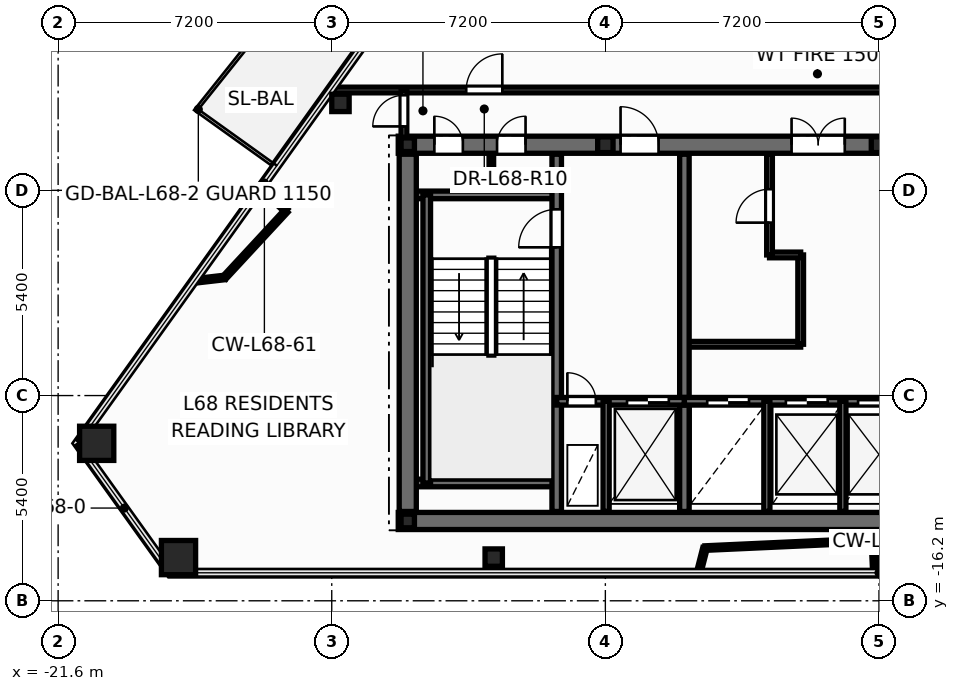
"""IFC4 building model, lengths in metres.
Left out: names, types, materials, properties, quantities, classifications, styles, units other than length and angle.
Written with IfcOpenShell. Run it as: python <this file> out.ifc"""

import sys

from ifc_helpers import new_model, si_unit, direction, frame, frame_2d, origin, origin_2d, place, context, subcontext, project, spatial, rectangle, hollow_rectangle, hollow_circle, i_section, extrude, element, fill, save


model = new_model("IFC4")
c1 = context("Model", 3, precision=1e-05, world=origin(), true_north=direction((0.0, 1.0)))
c2 = subcontext(c1, "Body", "Model", "MODEL_VIEW")
j1 = project(units=[si_unit("LENGTHUNIT", "METRE"), si_unit("PLANEANGLEUNIT", "RADIAN")], contexts=[c1])
p1 = place(None, origin())
s1 = spatial("IfcSite", under=j1, at=p1, CompositionType="ELEMENT")
p2 = place(p1, origin())
s2 = spatial("IfcBuilding", under=s1, at=p2, CompositionType="ELEMENT")
p3 = place(p2, frame((0.0, 0.0, 259.8)))
s3 = spatial("IfcBuildingStorey", under=s2, at=p3, CompositionType="ELEMENT", Elevation=259.8)
for number, where, z_axis, x_axis in (
    (1, (-20.585, -12.057, 0.0), (0.0, 0.0, 1.0), (1.0, 0.0, 0.0)),
    (2, (-18.432, -15.063, 0.0), (0.0, 0.0, 1.0), (1.0, 0.0, 0.0)),
):
    element("IfcColumn", number, at=place(p3, frame(where, z_axis=z_axis, x_axis=x_axis)), inside=s3, PredefinedType="COLUMN", context=c2, shape_type="SweptSolid", body=[
        extrude(hollow_rectangle(XDim=0.9, YDim=0.9, WallThickness=0.04, at=origin_2d()), origin(), (0.0, 0.0, 1.0), 3.6),
    ])
for number, where, z_axis, x_axis in (
    (3, (-10.138, -15.063, 0.0), (0.0, 0.0, 1.0), (1.0, 0.0, 0.0)),
    (4, (-14.171, -3.099, 0.0), (0.0, 0.0, 1.0), (1.0, 0.0, 0.0)),
):
    element("IfcColumn", number, at=place(p3, frame(where, z_axis=z_axis, x_axis=x_axis)), inside=s3, PredefinedType="COLUMN", context=c2, shape_type="SweptSolid", body=[
        extrude(hollow_circle(Radius=0.229, WallThickness=0.016, at=origin_2d()), origin(), (0.0, 0.0, 1.0), 3.6),
    ])
for number, where, z_axis, x_axis in (
    (5, (-12.4, -14.1, 0.0), (0.0, 0.0, 1.0), (1.0, 0.0, 0.0)),
    (6, (-12.4, -4.2, 0.0), (0.0, 0.0, 1.0), (1.0, 0.0, 0.0)),
):
    element("IfcColumn", number, at=place(p3, frame(where, z_axis=z_axis, x_axis=x_axis)), inside=s3, PredefinedType="COLUMN", context=c2, shape_type="SweptSolid", body=[
        extrude(i_section(OverallWidth=0.352, OverallDepth=0.359, WebThickness=0.018, FlangeThickness=0.026, at=origin_2d()), origin(), (0.0, 0.0, 1.0), 3.6),
    ])
for number, where, z_axis, x_axis in (
    (7, (-7.2, -4.2, 0.0), (0.0, 0.0, 1.0), (1.0, 0.0, 0.0)),
    (8, (0.0, -4.2, 0.0), (0.0, 0.0, 1.0), (1.0, 0.0, 0.0)),
):
    element("IfcColumn", number, at=place(p3, frame(where, z_axis=z_axis, x_axis=x_axis)), inside=s3, PredefinedType="PILASTER", context=c2, shape_type="SweptSolid", body=[
        extrude(i_section(OverallWidth=0.405, OverallDepth=0.414, WebThickness=0.022, FlangeThickness=0.032, at=origin_2d()), origin(), (0.0, 0.0, 1.0), 3.6),
    ])
p4 = place(p3, frame((-5.12, -9.45, 0.0), z_axis=(0.0, 0.0, 1.0), x_axis=(1.0, 0.0, 0.0)))
e9 = element("IfcWall", 9, at=p4, inside=s3, PredefinedType="PARTITIONING", context=c2, shape_type="SweptSolid", body=[
    extrude(rectangle(XDim=3.06, YDim=0.15, at=frame_2d((1.53, 0.0))), origin(), (0.0, 0.0, 1.0), 3.345),
])
p5 = place(p3, frame((-2.06, -9.45, 0.0), z_axis=(0.0, 0.0, 1.0), x_axis=(0.0, 1.0, 0.0)))
e10 = element("IfcWall", 10, at=p5, inside=s3, PredefinedType="PARTITIONING", context=c2, shape_type="SweptSolid", body=[
    extrude(rectangle(XDim=2.35, YDim=0.15, at=frame_2d((1.175, 0.0))), origin(), (0.0, 0.0, 1.0), 3.345),
])
p6 = place(p3, frame((-2.88, -7.1, 0.0), z_axis=(0.0, 0.0, 1.0), x_axis=(1.0, 0.0, 0.0)))
e11 = element("IfcWall", 11, at=p6, inside=s3, PredefinedType="PARTITIONING", context=c2, shape_type="SweptSolid", body=[
    extrude(rectangle(XDim=0.82, YDim=0.15, at=frame_2d((0.41, 0.0))), origin(), (0.0, 0.0, 1.0), 3.345),
])
p7 = place(p3, frame((-2.88, -7.1, 0.0), z_axis=(0.0, 0.0, 1.0), x_axis=(0.0, 1.0, 0.0)))
e12 = element("IfcWall", 12, at=p7, inside=s3, PredefinedType="PARTITIONING", context=c2, shape_type="SweptSolid", body=[
    extrude(rectangle(XDim=2.65, YDim=0.15, at=frame_2d((1.325, 0.0))), origin(), (0.0, 0.0, 1.0), 3.345),
])
p8 = place(p7, frame((0.85, 0.0, 0.0)))
e13 = element("IfcOpeningElement", 13, at=p8, cuts=e12, PredefinedType="OPENING", context=c2, shape_type="SweptSolid", body=[
    extrude(rectangle(XDim=0.886, YDim=2.104, at=frame_2d((0.44, 1.052))), frame((0.0, 0.085, 0.0), z_axis=(0.0, -1.0, 0.0), x_axis=(1.0, 0.0, 0.0)), (0.0, 0.0, 1.0), 0.17),
])
p9 = place(p3, frame((-10.2, -5.52, 0.0), z_axis=(0.0, 0.0, 1.0), x_axis=(0.0, 1.0, 0.0)))
e14 = element("IfcWall", 14, at=p9, inside=s3, PredefinedType="PARTITIONING", context=c2, shape_type="SweptSolid", body=[
    extrude(rectangle(XDim=1.12, YDim=0.12, at=frame_2d((0.56, 0.0))), origin(), (0.0, 0.0, 1.0), 3.345),
])
p10 = place(p3, frame((-12.65, -14.1, 0.0), z_axis=(0.0, 0.0, 1.0), x_axis=(1.0, 0.0, 0.0)))
e15 = element("IfcWall", 15, at=p10, inside=s3, PredefinedType="SHEAR", context=c2, shape_type="SweptSolid", body=[
    extrude(rectangle(XDim=25.3, YDim=0.45, at=frame_2d((12.65, 0.0))), origin(), (0.0, 0.0, 1.0), 3.6),
])
p11 = place(p3, frame((-12.65, -4.2, 0.0), z_axis=(0.0, 0.0, 1.0), x_axis=(1.0, 0.0, 0.0)))
e16 = element("IfcWall", 16, at=p11, inside=s3, PredefinedType="SHEAR", context=c2, shape_type="SweptSolid", body=[
    extrude(rectangle(XDim=25.3, YDim=0.45, at=frame_2d((12.65, 0.0))), origin(), (0.0, 0.0, 1.0), 3.6),
])
p12 = place(p11, frame((0.95, 0.0, 0.0)))
e17 = element("IfcOpeningElement", 17, at=p12, cuts=e16, PredefinedType="OPENING", context=c2, shape_type="SweptSolid", body=[
    extrude(rectangle(XDim=0.756, YDim=2.054, at=frame_2d((0.375, 1.027))), frame((0.0, 0.235, 0.0), z_axis=(0.0, -1.0, 0.0), x_axis=(1.0, 0.0, 0.0)), (0.0, 0.0, 1.0), 0.47),
])
p13 = place(p11, frame((2.6, 0.0, 0.0)))
e18 = element("IfcOpeningElement", 18, at=p13, cuts=e16, PredefinedType="OPENING", context=c2, shape_type="SweptSolid", body=[
    extrude(rectangle(XDim=0.756, YDim=2.054, at=frame_2d((0.375, 1.027))), frame((0.0, 0.235, 0.0), z_axis=(0.0, -1.0, 0.0), x_axis=(1.0, 0.0, 0.0)), (0.0, 0.0, 1.0), 0.47),
])
p14 = place(p11, frame((21.85, 0.0, 0.0)))
e19 = element("IfcOpeningElement", 19, at=p14, cuts=e16, PredefinedType="OPENING", context=c2, shape_type="SweptSolid", body=[
    extrude(rectangle(XDim=0.756, YDim=2.054, at=frame_2d((0.375, 1.027))), frame((0.0, 0.235, 0.0), z_axis=(0.0, -1.0, 0.0), x_axis=(1.0, 0.0, 0.0)), (0.0, 0.0, 1.0), 0.47),
])
p15 = place(p11, frame((23.5, 0.0, 0.0)))
e20 = element("IfcOpeningElement", 20, at=p15, cuts=e16, PredefinedType="OPENING", context=c2, shape_type="SweptSolid", body=[
    extrude(rectangle(XDim=0.756, YDim=2.054, at=frame_2d((0.375, 1.027))), frame((0.0, 0.235, 0.0), z_axis=(0.0, -1.0, 0.0), x_axis=(1.0, 0.0, 0.0)), (0.0, 0.0, 1.0), 0.47),
])
p16 = place(p11, frame((5.85, 0.0, 0.0)))
e21 = element("IfcOpeningElement", 21, at=p16, cuts=e16, PredefinedType="OPENING", context=c2, shape_type="SweptSolid", body=[
    extrude(rectangle(XDim=1.006, YDim=2.104, at=frame_2d((0.5, 1.052))), frame((0.0, 0.235, 0.0), z_axis=(0.0, -1.0, 0.0), x_axis=(1.0, 0.0, 0.0)), (0.0, 0.0, 1.0), 0.47),
])
p17 = place(p11, frame((10.35, 0.0, 0.0)))
e22 = element("IfcOpeningElement", 22, at=p17, cuts=e16, PredefinedType="OPENING", context=c2, shape_type="SweptSolid", body=[
    extrude(rectangle(XDim=1.406, YDim=2.154, at=frame_2d((0.7, 1.077))), frame((0.0, 0.235, 0.0), z_axis=(0.0, -1.0, 0.0), x_axis=(1.0, 0.0, 0.0)), (0.0, 0.0, 1.0), 0.47),
])
p18 = place(p11, frame((18.45, 0.0, 0.0)))
e23 = element("IfcOpeningElement", 23, at=p18, cuts=e16, PredefinedType="OPENING", context=c2, shape_type="SweptSolid", body=[
    extrude(rectangle(XDim=1.006, YDim=2.104, at=frame_2d((0.5, 1.052))), frame((0.0, 0.235, 0.0), z_axis=(0.0, -1.0, 0.0), x_axis=(1.0, 0.0, 0.0)), (0.0, 0.0, 1.0), 0.47),
])
for number, where, z_axis, x_axis in (
    (24, (-12.35, -5.52, 0.0), (0.0, 0.0, 1.0), (1.0, 0.0, 0.0)),
    (25, (-12.35, -13.1, 0.0), (0.0, 0.0, 1.0), (1.0, 0.0, 0.0)),
):
    element("IfcWall", number, at=place(p3, frame(where, z_axis=z_axis, x_axis=x_axis)), inside=s3, PredefinedType="SOLIDWALL", context=c2, shape_type="SweptSolid", body=[
        extrude(rectangle(XDim=3.87, YDim=0.2, at=frame_2d((1.935, 0.0))), origin(), (0.0, 0.0, 1.0), 3.6),
    ])
p19 = place(p3, frame((-11.9, -13.1, 0.0), z_axis=(0.0, 0.0, 1.0), x_axis=(0.0, 1.0, 0.0)))
e26 = element("IfcWall", 26, at=p19, inside=s3, PredefinedType="SOLIDWALL", context=c2, shape_type="SweptSolid", body=[
    extrude(rectangle(XDim=7.58, YDim=0.2, at=frame_2d((3.79, 0.0))), origin(), (0.0, 0.0, 1.0), 3.6),
])
p20 = place(p3, frame((-8.48, -13.85, 0.0), z_axis=(0.0, 0.0, 1.0), x_axis=(0.0, 1.0, 0.0)))
e27 = element("IfcWall", 27, at=p20, inside=s3, PredefinedType="SHEAR", context=c2, shape_type="SweptSolid", body=[
    extrude(rectangle(XDim=9.4, YDim=0.25, at=frame_2d((4.7, 0.0))), origin(), (0.0, 0.0, 1.0), 3.6),
])
p21 = place(p20, frame((6.95, 0.0, 0.0)))
e28 = element("IfcOpeningElement", 28, at=p21, cuts=e27, PredefinedType="OPENING", context=c2, shape_type="SweptSolid", body=[
    extrude(rectangle(XDim=1.006, YDim=2.104, at=frame_2d((0.5, 1.052))), frame((0.0, 0.135, 0.0), z_axis=(0.0, -1.0, 0.0), x_axis=(1.0, 0.0, 0.0)), (0.0, 0.0, 1.0), 0.27),
])
p22 = place(p3, frame((-5.12, -13.85, 0.0), z_axis=(0.0, 0.0, 1.0), x_axis=(0.0, 1.0, 0.0)))
e29 = element("IfcWall", 29, at=p22, inside=s3, PredefinedType="SHEAR", context=c2, shape_type="SweptSolid", body=[
    extrude(rectangle(XDim=9.4, YDim=0.25, at=frame_2d((4.7, 0.0))), origin(), (0.0, 0.0, 1.0), 3.6),
])
p23 = place(p3, frame((-8.48, -10.95, 0.0), z_axis=(0.0, 0.0, 1.0), x_axis=(1.0, 0.0, 0.0)))
e30 = element("IfcWall", 30, at=p23, inside=s3, PredefinedType="SOLIDWALL", context=c2, shape_type="SweptSolid", body=[
    extrude(rectangle(XDim=3.36, YDim=0.2, at=frame_2d((1.68, 0.0))), origin(), (0.0, 0.0, 1.0), 3.6),
])
p24 = place(p23, frame((0.28, 0.0, 0.0)))
e31 = element("IfcOpeningElement", 31, at=p24, cuts=e30, PredefinedType="OPENING", context=c2, shape_type="SweptSolid", body=[
    extrude(rectangle(XDim=0.756, YDim=2.054, at=frame_2d((0.375, 1.027))), frame((0.0, 0.11, 0.0), z_axis=(0.0, -1.0, 0.0), x_axis=(1.0, 0.0, 0.0)), (0.0, 0.0, 1.0), 0.22),
])
p25 = place(p23, frame((1.85, 0.0, 0.0)))
e32 = element("IfcOpeningElement", 32, at=p25, cuts=e30, PredefinedType="OPENING", context=c2, shape_type="SweptSolid", body=[
    extrude(rectangle(XDim=1.106, YDim=2.104, at=frame_2d((0.55, 1.052))), frame((0.0, 0.11, 0.0), z_axis=(0.0, -1.0, 0.0), x_axis=(1.0, 0.0, 0.0)), (0.0, 0.0, 1.0), 0.22),
])
p26 = place(p3, frame((-5.12, -10.95, 0.0), z_axis=(0.0, 0.0, 1.0), x_axis=(1.0, 0.0, 0.0)))
e33 = element("IfcWall", 33, at=p26, inside=s3, PredefinedType="SOLIDWALL", context=c2, shape_type="SweptSolid", body=[
    extrude(rectangle(XDim=10.24, YDim=0.2, at=frame_2d((5.12, 0.0))), origin(), (0.0, 0.0, 1.0), 3.6),
])
p27 = place(p26, frame((0.6, 0.0, 0.0)))
e34 = element("IfcOpeningElement", 34, at=p27, cuts=e33, PredefinedType="OPENING", context=c2, shape_type="SweptSolid", body=[
    extrude(rectangle(XDim=1.106, YDim=2.104, at=frame_2d((0.55, 1.052))), frame((0.0, 0.11, 0.0), z_axis=(0.0, -1.0, 0.0), x_axis=(1.0, 0.0, 0.0)), (0.0, 0.0, 1.0), 0.22),
])
p28 = place(p26, frame((2.67, 0.0, 0.0)))
e35 = element("IfcOpeningElement", 35, at=p28, cuts=e33, PredefinedType="OPENING", context=c2, shape_type="SweptSolid", body=[
    extrude(rectangle(XDim=1.106, YDim=2.104, at=frame_2d((0.55, 1.052))), frame((0.0, 0.11, 0.0), z_axis=(0.0, -1.0, 0.0), x_axis=(1.0, 0.0, 0.0)), (0.0, 0.0, 1.0), 0.22),
])
p29 = place(p26, frame((4.57, 0.0, 0.0)))
e36 = element("IfcOpeningElement", 36, at=p29, cuts=e33, PredefinedType="OPENING", context=c2, shape_type="SweptSolid", body=[
    extrude(rectangle(XDim=1.106, YDim=2.104, at=frame_2d((0.55, 1.052))), frame((0.0, 0.11, 0.0), z_axis=(0.0, -1.0, 0.0), x_axis=(1.0, 0.0, 0.0)), (0.0, 0.0, 1.0), 0.22),
])
p30 = place(p26, frame((6.47, 0.0, 0.0)))
e37 = element("IfcOpeningElement", 37, at=p30, cuts=e33, PredefinedType="OPENING", context=c2, shape_type="SweptSolid", body=[
    extrude(rectangle(XDim=1.106, YDim=2.104, at=frame_2d((0.55, 1.052))), frame((0.0, 0.11, 0.0), z_axis=(0.0, -1.0, 0.0), x_axis=(1.0, 0.0, 0.0)), (0.0, 0.0, 1.0), 0.22),
])
p31 = place(p26, frame((8.54, 0.0, 0.0)))
e38 = element("IfcOpeningElement", 38, at=p31, cuts=e33, PredefinedType="OPENING", context=c2, shape_type="SweptSolid", body=[
    extrude(rectangle(XDim=1.106, YDim=2.104, at=frame_2d((0.55, 1.052))), frame((0.0, 0.11, 0.0), z_axis=(0.0, -1.0, 0.0), x_axis=(1.0, 0.0, 0.0)), (0.0, 0.0, 1.0), 0.22),
])
for number, where, z_axis, x_axis in (
    (39, (-7.18, -13.85, 0.0), (0.0, 0.0, 1.0), (0.0, 1.0, 0.0)),
    (40, (-2.95, -13.85, 0.0), (0.0, 0.0, 1.0), (0.0, 1.0, 0.0)),
):
    element("IfcWall", number, at=place(p3, frame(where, z_axis=z_axis, x_axis=x_axis)), inside=s3, PredefinedType="PARTITIONING", context=c2, shape_type="SweptSolid", body=[
        extrude(rectangle(XDim=2.9, YDim=0.16, at=frame_2d((1.45, 0.0))), origin(), (0.0, 0.0, 1.0), 2.57),
    ])
p32 = place(p3, frame((-12.4, -13.85, 0.0), z_axis=(0.0, 0.0, 1.0), x_axis=(0.0, 1.0, 0.0)))
e41 = element("IfcWall", 41, at=p32, inside=s3, PredefinedType="SHEAR", context=c2, shape_type="SweptSolid", body=[
    extrude(rectangle(XDim=9.4, YDim=0.45, at=frame_2d((4.7, 0.0))), origin(), (0.0, 0.0, 1.0), 3.6),
])
p33 = place(p3, frame((-0.95, -13.85, 0.0), z_axis=(0.0, 0.0, 1.0), x_axis=(0.0, 1.0, 0.0)))
e42 = element("IfcWall", 42, at=p33, inside=s3, PredefinedType="PARTITIONING", context=c2, shape_type="SweptSolid", body=[
    extrude(rectangle(XDim=2.9, YDim=0.16, at=frame_2d((1.45, 0.0))), origin(), (0.0, 0.0, 1.0), 2.57),
])
p34 = place(p3, frame((-14.42, -2.76, 0.0), z_axis=(0.0, 0.0, 1.0), x_axis=(1.0, 0.0, 0.0)))
e43 = element("IfcWall", 43, at=p34, inside=s3, PredefinedType="PARTITIONING", context=c2, shape_type="SweptSolid", body=[
    extrude(rectangle(XDim=15.06, YDim=0.15, at=frame_2d((7.53, 0.0))), origin(), (0.0, 0.0, 1.0), 2.32),
])
p35 = place(p34, frame((3.559, 0.0, 0.0)))
e44 = element("IfcOpeningElement", 44, at=p35, cuts=e43, PredefinedType="OPENING", context=c2, shape_type="SweptSolid", body=[
    extrude(rectangle(XDim=0.956, YDim=2.104, at=frame_2d((0.475, 1.052))), frame((0.0, 0.085, 0.0), z_axis=(0.0, -1.0, 0.0), x_axis=(1.0, 0.0, 0.0)), (0.0, 0.0, 1.0), 0.17),
])
p36 = place(p3, frame((-4.578, -14.813, 0.0), z_axis=(0.0, 0.0, 1.0), x_axis=(0.998953966619, 0.045727153589, 0.0)))
e45 = element("IfcWall", 45, at=p36, inside=s3, PredefinedType="PARTITIONING", context=c2, shape_type="SweptSolid", body=[
    extrude(rectangle(XDim=4.437, YDim=0.12, at=frame_2d((2.218, 0.0))), origin(), (0.0, 0.0, 1.0), 3.345),
])
p37 = place(p3, frame((-15.595, -5.938, 0.0), z_axis=(0.0, 0.0, 1.0), x_axis=(-0.679546396481, -0.733632534059, 0.0)))
e46 = element("IfcWall", 46, at=p37, inside=s3, PredefinedType="PARTITIONING", context=c2, shape_type="SweptSolid", body=[
    extrude(rectangle(XDim=2.392, YDim=0.12, at=frame_2d((1.196, 0.0))), origin(), (0.0, 0.0, 1.0), 3.345),
])
p38 = place(p3, frame((-12.5, -4.24, 0.0), z_axis=(0.0, 0.0, 1.0), x_axis=(0.0, 1.0, 0.0)))
e47 = element("IfcWall", 47, at=p38, inside=s3, PredefinedType="PARTITIONING", context=c2, shape_type="SweptSolid", body=[
    extrude(rectangle(XDim=1.48, YDim=0.15, at=frame_2d((0.74, 0.0))), origin(), (0.0, 0.0, 1.0), 2.32),
])
p39 = place(p38, frame((0.522, 0.0, 0.0)))
e48 = element("IfcOpeningElement", 48, at=p39, cuts=e47, PredefinedType="OPENING", context=c2, shape_type="SweptSolid", body=[
    extrude(rectangle(XDim=0.826, YDim=2.104, at=frame_2d((0.41, 1.052))), frame((0.0, 0.085, 0.0), z_axis=(0.0, -1.0, 0.0), x_axis=(1.0, 0.0, 0.0)), (0.0, 0.0, 1.0), 0.17),
])
p40 = place(p3, frame((-16.249, -5.332, 0.0), z_axis=(0.0, 0.0, 1.0), x_axis=(0.733563468534, -0.679620951437, 0.0)))
e49 = element("IfcWall", 49, at=p40, inside=s3, PredefinedType="PARTITIONING", context=c2, shape_type="SweptSolid", body=[
    extrude(rectangle(XDim=0.892, YDim=0.12, at=frame_2d((0.446, 0.0))), origin(), (0.0, 0.0, 1.0), 2.863),
])
p41 = place(p3, frame((-0.146, -14.61, 0.0), z_axis=(0.0, 0.0, 1.0), x_axis=(0.045709485804, -0.998954775206, 0.0)))
e50 = element("IfcWall", 50, at=p41, inside=s3, PredefinedType="PARTITIONING", context=c2, shape_type="SweptSolid", body=[
    extrude(rectangle(XDim=0.844, YDim=0.12, at=frame_2d((0.422, 0.0))), origin(), (0.0, 0.0, 1.0), 2.863),
])
p42 = place(p3, frame((-17.221, -7.693, 0.0), z_axis=(0.0, 0.0, 1.0), x_axis=(-0.993422482681, -0.114506641306, 0.0)))
e51 = element("IfcWall", 51, at=p42, inside=s3, PredefinedType="PARTITIONING", context=c2, shape_type="SweptSolid", body=[
    extrude(rectangle(XDim=0.789, YDim=0.12, at=frame_2d((0.395, 0.0))), origin(), (0.0, 0.0, 1.0), 2.863),
])
p43 = place(p3, frame((-4.742, -15.453, 0.0), z_axis=(0.0, 0.0, 1.0), x_axis=(0.248615313318, 0.968602305378, 0.0)))
e52 = element("IfcWall", 52, at=p43, inside=s3, PredefinedType="PARTITIONING", context=c2, shape_type="SweptSolid", body=[
    extrude(rectangle(XDim=0.661, YDim=0.12, at=frame_2d((0.331, 0.0))), origin(), (0.0, 0.0, 1.0), 2.863),
])
p44 = place(p8, origin())
e53 = element("IfcDoor", 53, at=p44, inside=s3, OperationType="SINGLE_SWING_LEFT", PredefinedType="DOOR", context=c2, shape_type="SweptSolid", body=[
    extrude(rectangle(XDim=0.88, YDim=2.1, at=frame_2d((0.44, 1.05))), frame((0.0, 0.025, 0.0), z_axis=(0.0, -1.0, 0.0), x_axis=(1.0, 0.0, 0.0)), (0.0, 0.0, 1.0), 0.05),
])
fill(e13, e53)
p45 = place(p21, origin())
e54 = element("IfcDoor", 54, at=p45, inside=s3, OperationType="SINGLE_SWING_LEFT", PredefinedType="DOOR", context=c2, shape_type="SweptSolid", body=[
    extrude(rectangle(XDim=1.0, YDim=2.1, at=frame_2d((0.5, 1.05))), frame((0.0, 0.025, 0.0), z_axis=(0.0, -1.0, 0.0), x_axis=(1.0, 0.0, 0.0)), (0.0, 0.0, 1.0), 0.05),
])
fill(e28, e54)
p46 = place(p24, origin())
e55 = element("IfcDoor", 55, at=p46, inside=s3, OperationType="SINGLE_SWING_LEFT", PredefinedType="DOOR", context=c2, shape_type="SweptSolid", body=[
    extrude(rectangle(XDim=0.75, YDim=2.05, at=frame_2d((0.375, 1.025))), frame((0.0, 0.025, 0.0), z_axis=(0.0, -1.0, 0.0), x_axis=(1.0, 0.0, 0.0)), (0.0, 0.0, 1.0), 0.05),
])
fill(e31, e55)
p47 = place(p25, origin())
e56 = element("IfcDoor", 56, at=p47, inside=s3, OperationType="DOUBLE_DOOR_SLIDING", PredefinedType="DOOR", context=c2, shape_type="SweptSolid", body=[
    extrude(rectangle(XDim=1.1, YDim=2.1, at=frame_2d((0.55, 1.05))), frame((0.0, 0.025, 0.0), z_axis=(0.0, -1.0, 0.0), x_axis=(1.0, 0.0, 0.0)), (0.0, 0.0, 1.0), 0.05),
])
fill(e32, e56)
p48 = place(p27, origin())
e57 = element("IfcDoor", 57, at=p48, inside=s3, OperationType="DOUBLE_DOOR_SLIDING", PredefinedType="DOOR", context=c2, shape_type="SweptSolid", body=[
    extrude(rectangle(XDim=1.1, YDim=2.1, at=frame_2d((0.55, 1.05))), frame((0.0, 0.025, 0.0), z_axis=(0.0, -1.0, 0.0), x_axis=(1.0, 0.0, 0.0)), (0.0, 0.0, 1.0), 0.05),
])
fill(e34, e57)
p49 = place(p28, origin())
e58 = element("IfcDoor", 58, at=p49, inside=s3, OperationType="DOUBLE_DOOR_SLIDING", PredefinedType="DOOR", context=c2, shape_type="SweptSolid", body=[
    extrude(rectangle(XDim=1.1, YDim=2.1, at=frame_2d((0.55, 1.05))), frame((0.0, 0.025, 0.0), z_axis=(0.0, -1.0, 0.0), x_axis=(1.0, 0.0, 0.0)), (0.0, 0.0, 1.0), 0.05),
])
fill(e35, e58)
p50 = place(p29, origin())
e59 = element("IfcDoor", 59, at=p50, inside=s3, OperationType="DOUBLE_DOOR_SLIDING", PredefinedType="DOOR", context=c2, shape_type="SweptSolid", body=[
    extrude(rectangle(XDim=1.1, YDim=2.1, at=frame_2d((0.55, 1.05))), frame((0.0, 0.025, 0.0), z_axis=(0.0, -1.0, 0.0), x_axis=(1.0, 0.0, 0.0)), (0.0, 0.0, 1.0), 0.05),
])
fill(e36, e59)
p51 = place(p12, origin())
e60 = element("IfcDoor", 60, at=p51, inside=s3, OperationType="SINGLE_SWING_LEFT", PredefinedType="DOOR", context=c2, shape_type="SweptSolid", body=[
    extrude(rectangle(XDim=0.75, YDim=2.05, at=frame_2d((0.375, 1.025))), frame((0.0, 0.025, 0.0), z_axis=(0.0, -1.0, 0.0), x_axis=(1.0, 0.0, 0.0)), (0.0, 0.0, 1.0), 0.05),
])
fill(e17, e60)
p52 = place(p13, origin())
e61 = element("IfcDoor", 61, at=p52, inside=s3, OperationType="SINGLE_SWING_RIGHT", PredefinedType="DOOR", context=c2, shape_type="SweptSolid", body=[
    extrude(rectangle(XDim=0.75, YDim=2.05, at=frame_2d((0.375, 1.025))), frame((0.0, 0.025, 0.0), z_axis=(0.0, -1.0, 0.0), x_axis=(1.0, 0.0, 0.0)), (0.0, 0.0, 1.0), 0.05),
])
fill(e18, e61)
p53 = place(p16, origin())
e62 = element("IfcDoor", 62, at=p53, inside=s3, OperationType="SINGLE_SWING_LEFT", PredefinedType="DOOR", context=c2, shape_type="SweptSolid", body=[
    extrude(rectangle(XDim=1.0, YDim=2.1, at=frame_2d((0.5, 1.05))), frame((0.0, 0.025, 0.0), z_axis=(0.0, -1.0, 0.0), x_axis=(1.0, 0.0, 0.0)), (0.0, 0.0, 1.0), 0.05),
])
fill(e21, e62)
p54 = place(p17, origin())
e63 = element("IfcDoor", 63, at=p54, inside=s3, OperationType="DOUBLE_DOOR_SINGLE_SWING", PredefinedType="DOOR", context=c2, shape_type="SweptSolid", body=[
    extrude(rectangle(XDim=1.4, YDim=2.15, at=frame_2d((0.7, 1.075))), frame((0.0, 0.025, 0.0), z_axis=(0.0, -1.0, 0.0), x_axis=(1.0, 0.0, 0.0)), (0.0, 0.0, 1.0), 0.05),
])
fill(e22, e63)
p55 = place(p39, origin())
e64 = element("IfcDoor", 64, at=p55, inside=s3, OperationType="SINGLE_SWING_LEFT", PredefinedType="DOOR", context=c2, shape_type="SweptSolid", body=[
    extrude(rectangle(XDim=0.82, YDim=2.1, at=frame_2d((0.41, 1.05))), frame((0.0, 0.025, 0.0), z_axis=(0.0, -1.0, 0.0), x_axis=(1.0, 0.0, 0.0)), (0.0, 0.0, 1.0), 0.05),
])
fill(e48, e64)
p56 = place(p35, origin())
e65 = element("IfcDoor", 65, at=p56, inside=s3, OperationType="SINGLE_SWING_RIGHT", PredefinedType="DOOR", context=c2, shape_type="SweptSolid", body=[
    extrude(rectangle(XDim=0.95, YDim=2.1, at=frame_2d((0.475, 1.05))), frame((0.0, 0.025, 0.0), z_axis=(0.0, -1.0, 0.0), x_axis=(1.0, 0.0, 0.0)), (0.0, 0.0, 1.0), 0.05),
])
fill(e44, e65)
save(model, sys.argv[1])
